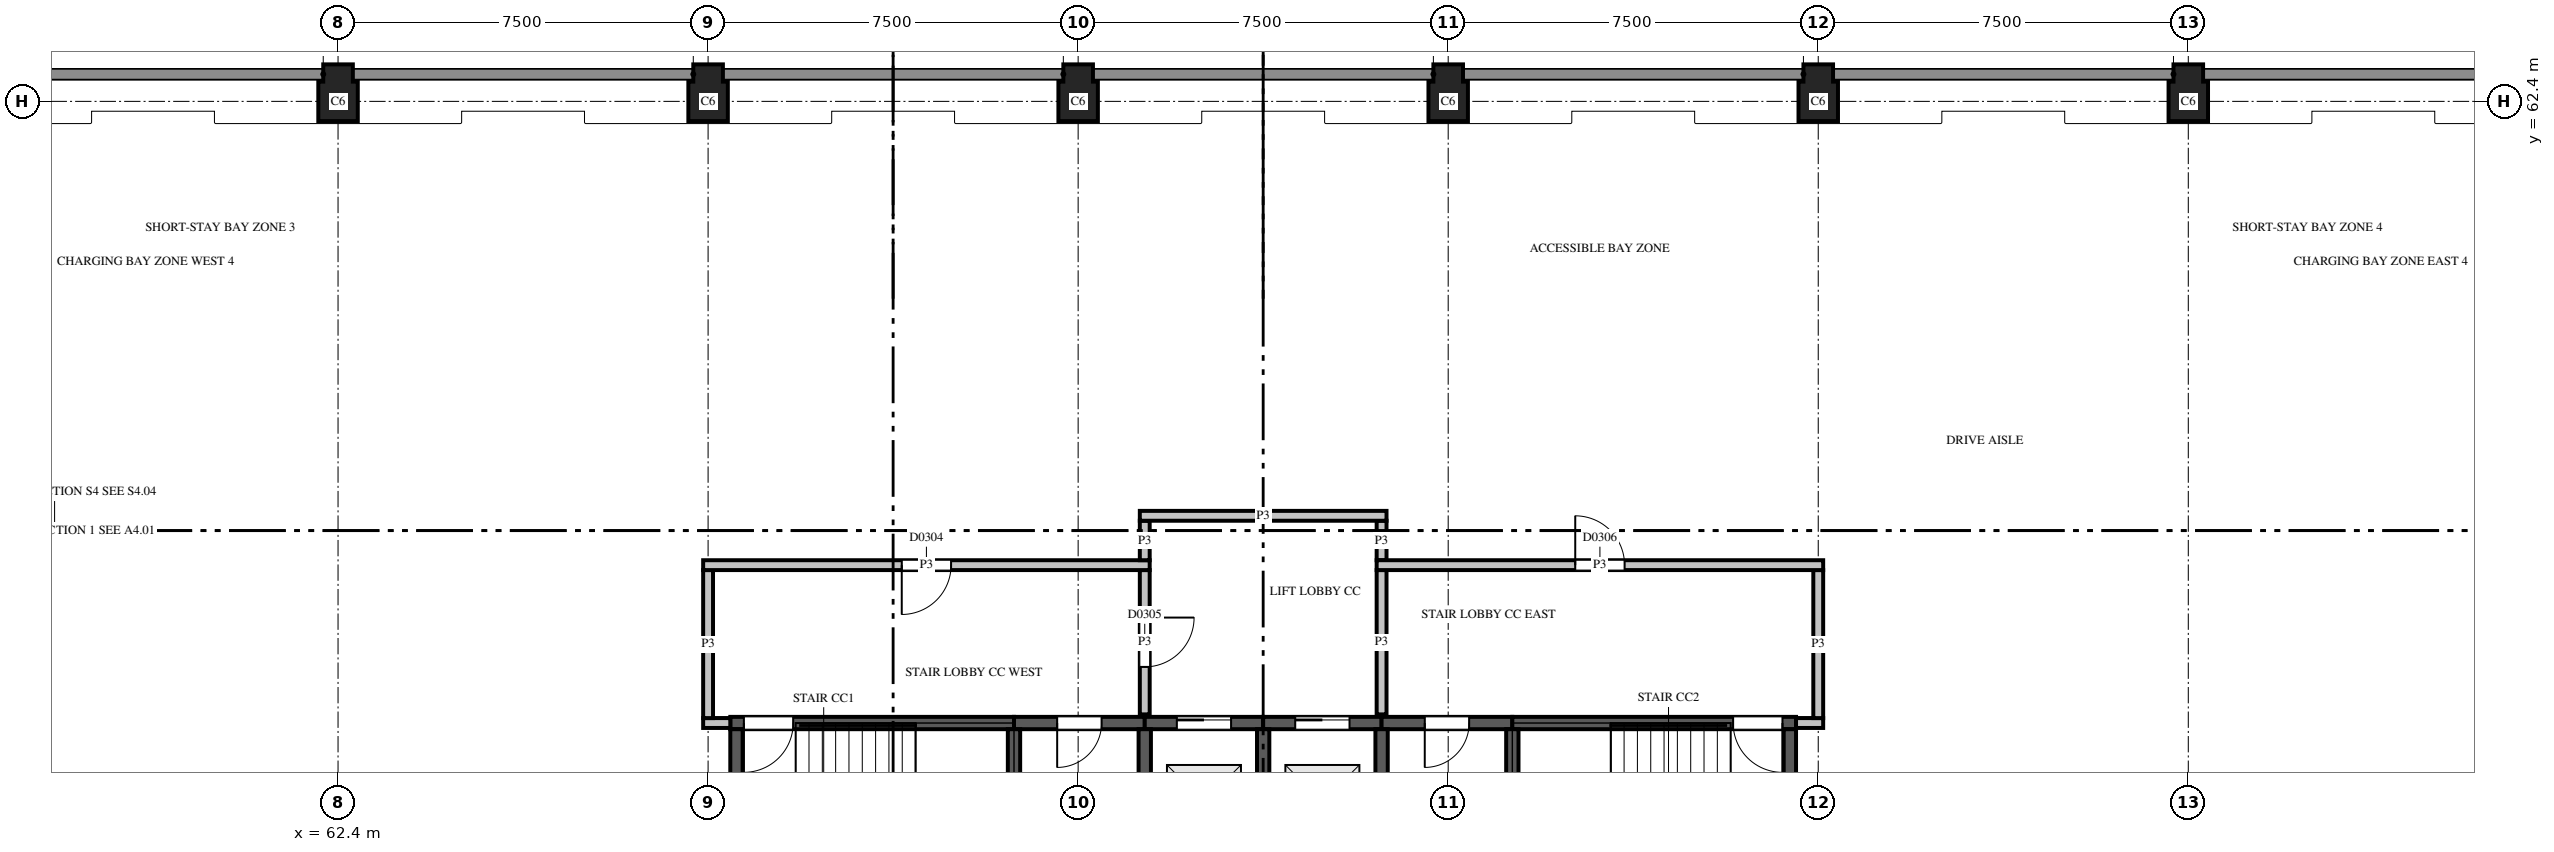
"""IFC4 building model, lengths in metres.
Left out: names, types, materials, properties, quantities, classifications, styles, units other than length and angle.
Written with IfcOpenShell. Run it as: python <this file> out.ifc"""

import sys

from ifc_helpers import new_model, si_unit, direction, frame, frame_2d, origin, place, context, subcontext, project, spatial, polyline, rectangle, outline, extrude, element, fill, save


model = new_model("IFC4")
c1 = context("Model", 3, precision=1e-05, world=origin(), true_north=direction((0.0, 1.0)))
c2 = subcontext(c1, "Body", "Model", "MODEL_VIEW")
j1 = project(units=[si_unit("LENGTHUNIT", "METRE"), si_unit("PLANEANGLEUNIT", "RADIAN")], contexts=[c1])
p1 = place(None, origin())
s1 = spatial("IfcSite", under=j1, at=p1, CompositionType="ELEMENT")
p2 = place(p1, origin())
s2 = spatial("IfcBuilding", under=s1, at=p2, CompositionType="ELEMENT")
p3 = place(p2, frame((0.0, 0.0, 11.9)))
s3 = spatial("IfcBuildingStorey", under=s2, at=p3, CompositionType="ELEMENT", Elevation=11.9)
for number, where, z_axis, x_axis in (
    (1, (62.4, 62.4, 0.0), (0.0, 0.0, 1.0), (0.0, 1.0, 0.0)),
    (2, (69.9, 62.4, 0.0), (0.0, 0.0, 1.0), (0.0, 1.0, 0.0)),
    (3, (77.4, 62.4, 0.0), (0.0, 0.0, 1.0), (0.0, 1.0, 0.0)),
    (4, (84.9, 62.4, 0.0), (0.0, 0.0, 1.0), (0.0, 1.0, 0.0)),
    (5, (92.4, 62.4, 0.0), (0.0, 0.0, 1.0), (0.0, 1.0, 0.0)),
    (6, (99.9, 62.4, 0.0), (0.0, 0.0, 1.0), (0.0, 1.0, 0.0)),
):
    element("IfcColumn", number, at=place(p3, frame(where, z_axis=z_axis, x_axis=x_axis)), inside=s3, PredefinedType="COLUMN", context=c2, shape_type="SweptSolid", body=[
        extrude(outline(polyline([(-0.4, -0.4), (0.4, -0.4), (0.4, -0.3), (0.75, -0.3), (0.75, 0.3), (0.4, 0.3), (0.4, 0.4), (-0.4, 0.4), (-0.4, -0.4)])), origin(), (0.0, 0.0, 1.0), 3.7),
    ])
p4 = place(p3, frame((70.35, 49.8, 0.0), z_axis=(0.0, 0.0, 1.0), x_axis=(1.0, 0.0, 0.0)))
e7 = element("IfcWall", 7, at=p4, inside=s3, PredefinedType="SHEAR", context=c2, shape_type="SweptSolid", body=[
    extrude(rectangle(XDim=5.75, YDim=0.25, at=frame_2d((2.875, 0.0))), origin(), (0.0, 0.0, 1.0), 3.7),
])
p5 = place(p4, frame((0.275, 0.0, 0.0)))
e8 = element("IfcOpeningElement", 8, at=p5, cuts=e7, PredefinedType="OPENING", context=c2, shape_type="SweptSolid", body=[
    extrude(rectangle(XDim=1.0, YDim=2.1, at=frame_2d((0.5, 1.05))), frame((0.0, 0.135, 0.0), z_axis=(0.0, -1.0, 0.0), x_axis=(1.0, 0.0, 0.0)), (0.0, 0.0, 1.0), 0.27),
])
p6 = place(p3, frame((76.1, 49.8, 0.0), z_axis=(0.0, 0.0, 1.0), x_axis=(1.0, 0.0, 0.0)))
e9 = element("IfcWall", 9, at=p6, inside=s3, PredefinedType="SHEAR", context=c2, shape_type="SweptSolid", body=[
    extrude(rectangle(XDim=2.65, YDim=0.25, at=frame_2d((1.325, 0.0))), origin(), (0.0, 0.0, 1.0), 3.7),
])
p7 = place(p6, frame((0.875, 0.0, 0.0)))
e10 = element("IfcOpeningElement", 10, at=p7, cuts=e9, PredefinedType="OPENING", context=c2, shape_type="SweptSolid", body=[
    extrude(rectangle(XDim=0.9, YDim=2.1, at=frame_2d((0.45, 1.05))), frame((0.0, 0.135, 0.0), z_axis=(0.0, -1.0, 0.0), x_axis=(1.0, 0.0, 0.0)), (0.0, 0.0, 1.0), 0.27),
])
p8 = place(p3, frame((78.75, 49.8, 0.0), z_axis=(0.0, 0.0, 1.0), x_axis=(1.0, 0.0, 0.0)))
e11 = element("IfcWall", 11, at=p8, inside=s3, PredefinedType="SHEAR", context=c2, shape_type="SweptSolid", body=[
    extrude(rectangle(XDim=2.4, YDim=0.25, at=frame_2d((1.2, 0.0))), origin(), (0.0, 0.0, 1.0), 3.7),
])
p9 = place(p8, frame((0.65, 0.0, 0.0)))
e12 = element("IfcOpeningElement", 12, at=p9, cuts=e11, PredefinedType="OPENING", context=c2, shape_type="SweptSolid", body=[
    extrude(rectangle(XDim=1.1, YDim=2.1, at=frame_2d((0.55, 1.05))), frame((0.0, 0.135, 0.0), z_axis=(0.0, -1.0, 0.0), x_axis=(1.0, 0.0, 0.0)), (0.0, 0.0, 1.0), 0.27),
])
p10 = place(p3, frame((81.15, 49.8, 0.0), z_axis=(0.0, 0.0, 1.0), x_axis=(1.0, 0.0, 0.0)))
e13 = element("IfcWall", 13, at=p10, inside=s3, PredefinedType="SHEAR", context=c2, shape_type="SweptSolid", body=[
    extrude(rectangle(XDim=2.4, YDim=0.25, at=frame_2d((1.2, 0.0))), origin(), (0.0, 0.0, 1.0), 3.7),
])
p11 = place(p10, frame((0.65, 0.0, 0.0)))
e14 = element("IfcOpeningElement", 14, at=p11, cuts=e13, PredefinedType="OPENING", context=c2, shape_type="SweptSolid", body=[
    extrude(rectangle(XDim=1.1, YDim=2.1, at=frame_2d((0.55, 1.05))), frame((0.0, 0.135, 0.0), z_axis=(0.0, -1.0, 0.0), x_axis=(1.0, 0.0, 0.0)), (0.0, 0.0, 1.0), 0.27),
])
p12 = place(p3, frame((83.55, 49.8, 0.0), z_axis=(0.0, 0.0, 1.0), x_axis=(1.0, 0.0, 0.0)))
e15 = element("IfcWall", 15, at=p12, inside=s3, PredefinedType="SHEAR", context=c2, shape_type="SweptSolid", body=[
    extrude(rectangle(XDim=2.65, YDim=0.25, at=frame_2d((1.325, 0.0))), origin(), (0.0, 0.0, 1.0), 3.7),
])
p13 = place(p12, frame((0.875, 0.0, 0.0)))
e16 = element("IfcOpeningElement", 16, at=p13, cuts=e15, PredefinedType="OPENING", context=c2, shape_type="SweptSolid", body=[
    extrude(rectangle(XDim=0.9, YDim=2.1, at=frame_2d((0.45, 1.05))), frame((0.0, 0.135, 0.0), z_axis=(0.0, -1.0, 0.0), x_axis=(1.0, 0.0, 0.0)), (0.0, 0.0, 1.0), 0.27),
])
p14 = place(p3, frame((86.2, 49.8, 0.0), z_axis=(0.0, 0.0, 1.0), x_axis=(1.0, 0.0, 0.0)))
e17 = element("IfcWall", 17, at=p14, inside=s3, PredefinedType="SHEAR", context=c2, shape_type="SweptSolid", body=[
    extrude(rectangle(XDim=5.75, YDim=0.25, at=frame_2d((2.875, 0.0))), origin(), (0.0, 0.0, 1.0), 3.7),
])
p15 = place(p14, frame((4.475, 0.0, 0.0)))
e18 = element("IfcOpeningElement", 18, at=p15, cuts=e17, PredefinedType="OPENING", context=c2, shape_type="SweptSolid", body=[
    extrude(rectangle(XDim=1.0, YDim=2.1, at=frame_2d((0.5, 1.05))), frame((0.0, 0.135, 0.0), z_axis=(0.0, -1.0, 0.0), x_axis=(1.0, 0.0, 0.0)), (0.0, 0.0, 1.0), 0.27),
])
for number, where, z_axis, x_axis in (
    (19, (70.475, 45.7, 0.0), (0.0, 0.0, 1.0), (0.0, 1.0, 0.0)),
    (20, (76.1, 45.7, 0.0), (0.0, 0.0, 1.0), (0.0, 1.0, 0.0)),
):
    element("IfcWall", number, at=place(p3, frame(where, z_axis=z_axis, x_axis=x_axis)), inside=s3, PredefinedType="SHEAR", context=c2, shape_type="SweptSolid", body=[
        extrude(rectangle(XDim=3.975, YDim=0.25, at=frame_2d((1.988, 0.0))), origin(), (0.0, 0.0, 1.0), 3.7),
    ])
p16 = place(p3, frame((78.75, 46.6, 0.0), z_axis=(0.0, 0.0, 1.0), x_axis=(0.0, 1.0, 0.0)))
e21 = element("IfcWall", 21, at=p16, inside=s3, PredefinedType="SHEAR", context=c2, shape_type="SweptSolid", body=[
    extrude(rectangle(XDim=3.075, YDim=0.25, at=frame_2d((1.538, 0.0))), origin(), (0.0, 0.0, 1.0), 3.7),
])
p17 = place(p3, frame((81.15, 46.725, 0.0), z_axis=(0.0, 0.0, 1.0), x_axis=(0.0, 1.0, 0.0)))
e22 = element("IfcWall", 22, at=p17, inside=s3, PredefinedType="SHEAR", context=c2, shape_type="SweptSolid", body=[
    extrude(rectangle(XDim=2.95, YDim=0.25, at=frame_2d((1.475, 0.0))), origin(), (0.0, 0.0, 1.0), 3.7),
])
p18 = place(p3, frame((83.55, 46.6, 0.0), z_axis=(0.0, 0.0, 1.0), x_axis=(0.0, 1.0, 0.0)))
e23 = element("IfcWall", 23, at=p18, inside=s3, PredefinedType="SHEAR", context=c2, shape_type="SweptSolid", body=[
    extrude(rectangle(XDim=3.075, YDim=0.25, at=frame_2d((1.538, 0.0))), origin(), (0.0, 0.0, 1.0), 3.7),
])
for number, where, z_axis, x_axis in (
    (24, (86.2, 45.7, 0.0), (0.0, 0.0, 1.0), (0.0, 1.0, 0.0)),
    (25, (91.825, 45.7, 0.0), (0.0, 0.0, 1.0), (0.0, 1.0, 0.0)),
):
    element("IfcWall", number, at=place(p3, frame(where, z_axis=z_axis, x_axis=x_axis)), inside=s3, PredefinedType="SHEAR", context=c2, shape_type="SweptSolid", body=[
        extrude(rectangle(XDim=3.975, YDim=0.25, at=frame_2d((1.988, 0.0))), origin(), (0.0, 0.0, 1.0), 3.7),
    ])
for number, where, z_axis, x_axis in (
    (26, (69.8, 49.8, 0.0), (0.0, 0.0, 1.0), (1.0, 0.0, 0.0)),
    (27, (91.95, 49.8, 0.0), (0.0, 0.0, 1.0), (1.0, 0.0, 0.0)),
):
    element("IfcWall", number, at=place(p3, frame(where, z_axis=z_axis, x_axis=x_axis)), inside=s3, PredefinedType="PARTITIONING", context=c2, shape_type="SweptSolid", body=[
        extrude(rectangle(XDim=0.55, YDim=0.2, at=frame_2d((0.275, 0.0))), origin(), (0.0, 0.0, 1.0), 2.88),
    ])
p19 = place(p3, frame((92.4, 49.9, 0.0), z_axis=(0.0, 0.0, 1.0), x_axis=(0.0, 1.0, 0.0)))
e28 = element("IfcWall", 28, at=p19, inside=s3, PredefinedType="PARTITIONING", context=c2, shape_type="SweptSolid", body=[
    extrude(rectangle(XDim=3.0, YDim=0.2, at=frame_2d((1.5, 0.0))), origin(), (0.0, 0.0, 1.0), 2.88),
])
p20 = place(p3, frame((78.75, 49.975, 0.0), z_axis=(0.0, 0.0, 1.0), x_axis=(0.0, 1.0, 0.0)))
e29 = element("IfcWall", 29, at=p20, inside=s3, PredefinedType="PARTITIONING", context=c2, shape_type="SweptSolid", body=[
    extrude(rectangle(XDim=2.925, YDim=0.2, at=frame_2d((1.462, 0.0))), origin(), (0.0, 0.0, 1.0), 2.88),
])
p21 = place(p20, frame((0.962, 0.0, 0.0)))
e30 = element("IfcOpeningElement", 30, at=p21, cuts=e29, PredefinedType="OPENING", context=c2, shape_type="SweptSolid", body=[
    extrude(rectangle(XDim=1.0, YDim=2.1, at=frame_2d((0.5, 1.05))), frame((0.0, 0.11, 0.0), z_axis=(0.0, -1.0, 0.0), x_axis=(1.0, 0.0, 0.0)), (0.0, 0.0, 1.0), 0.22),
])
p22 = place(p3, frame((83.55, 49.975, 0.0), z_axis=(0.0, 0.0, 1.0), x_axis=(0.0, 1.0, 0.0)))
e31 = element("IfcWall", 31, at=p22, inside=s3, PredefinedType="PARTITIONING", context=c2, shape_type="SweptSolid", body=[
    extrude(rectangle(XDim=2.925, YDim=0.2, at=frame_2d((1.462, 0.0))), origin(), (0.0, 0.0, 1.0), 2.88),
])
p23 = place(p3, frame((69.9, 52.9, 0.0), z_axis=(0.0, 0.0, 1.0), x_axis=(0.0, -1.0, 0.0)))
e32 = element("IfcWall", 32, at=p23, inside=s3, PredefinedType="PARTITIONING", context=c2, shape_type="SweptSolid", body=[
    extrude(rectangle(XDim=3.0, YDim=0.2, at=frame_2d((1.5, 0.0))), origin(), (0.0, 0.0, 1.0), 2.88),
])
p24 = place(p3, frame((78.85, 53.0, 0.0), z_axis=(0.0, 0.0, 1.0), x_axis=(-1.0, 0.0, 0.0)))
e33 = element("IfcWall", 33, at=p24, inside=s3, PredefinedType="PARTITIONING", context=c2, shape_type="SweptSolid", body=[
    extrude(rectangle(XDim=9.05, YDim=0.2, at=frame_2d((4.525, 0.0))), origin(), (0.0, 0.0, 1.0), 2.88),
])
p25 = place(p24, frame((4.025, 0.0, 0.0)))
e34 = element("IfcOpeningElement", 34, at=p25, cuts=e33, PredefinedType="OPENING", context=c2, shape_type="SweptSolid", body=[
    extrude(rectangle(XDim=1.0, YDim=2.1, at=frame_2d((0.5, 1.05))), frame((0.0, 0.11, 0.0), z_axis=(0.0, -1.0, 0.0), x_axis=(1.0, 0.0, 0.0)), (0.0, 0.0, 1.0), 0.22),
])
p26 = place(p3, frame((83.55, 53.1, 0.0), z_axis=(0.0, 0.0, 1.0), x_axis=(0.0, 1.0, 0.0)))
e35 = element("IfcWall", 35, at=p26, inside=s3, PredefinedType="PARTITIONING", context=c2, shape_type="SweptSolid", body=[
    extrude(rectangle(XDim=0.8, YDim=0.2, at=frame_2d((0.4, 0.0))), origin(), (0.0, 0.0, 1.0), 2.88),
])
p27 = place(p3, frame((92.5, 53.0, 0.0), z_axis=(0.0, 0.0, 1.0), x_axis=(-1.0, 0.0, 0.0)))
e36 = element("IfcWall", 36, at=p27, inside=s3, PredefinedType="PARTITIONING", context=c2, shape_type="SweptSolid", body=[
    extrude(rectangle(XDim=9.05, YDim=0.2, at=frame_2d((4.525, 0.0))), origin(), (0.0, 0.0, 1.0), 2.88),
])
p28 = place(p27, frame((4.025, 0.0, 0.0)))
e37 = element("IfcOpeningElement", 37, at=p28, cuts=e36, PredefinedType="OPENING", context=c2, shape_type="SweptSolid", body=[
    extrude(rectangle(XDim=1.0, YDim=2.1, at=frame_2d((0.5, 1.05))), frame((0.0, 0.11, 0.0), z_axis=(0.0, -1.0, 0.0), x_axis=(1.0, 0.0, 0.0)), (0.0, 0.0, 1.0), 0.22),
])
p29 = place(p3, frame((78.75, 53.9, 0.0), z_axis=(0.0, 0.0, 1.0), x_axis=(0.0, -1.0, 0.0)))
e38 = element("IfcWall", 38, at=p29, inside=s3, PredefinedType="PARTITIONING", context=c2, shape_type="SweptSolid", body=[
    extrude(rectangle(XDim=0.8, YDim=0.2, at=frame_2d((0.4, 0.0))), origin(), (0.0, 0.0, 1.0), 2.88),
])
p30 = place(p3, frame((83.65, 54.0, 0.0), z_axis=(0.0, 0.0, 1.0), x_axis=(-1.0, 0.0, 0.0)))
e39 = element("IfcWall", 39, at=p30, inside=s3, PredefinedType="PARTITIONING", context=c2, shape_type="SweptSolid", body=[
    extrude(rectangle(XDim=5.0, YDim=0.2, at=frame_2d((2.5, 0.0))), origin(), (0.0, 0.0, 1.0), 2.88),
])
p31 = place(p25, origin())
e40 = element("IfcDoor", 40, at=p31, inside=s3, OperationType="SINGLE_SWING_LEFT", PredefinedType="DOOR", context=c2, shape_type="SweptSolid", body=[
    extrude(rectangle(XDim=1.0, YDim=2.1, at=frame_2d((0.5, 1.05))), frame((0.0, 0.025, 0.0), z_axis=(0.0, -1.0, 0.0), x_axis=(1.0, 0.0, 0.0)), (0.0, 0.0, 1.0), 0.05),
])
fill(e34, e40)
p32 = place(p21, origin())
e41 = element("IfcDoor", 41, at=p32, inside=s3, OperationType="SINGLE_SWING_RIGHT", PredefinedType="DOOR", context=c2, shape_type="SweptSolid", body=[
    extrude(rectangle(XDim=1.0, YDim=2.1, at=frame_2d((0.5, 1.05))), frame((0.0, 0.025, 0.0), z_axis=(0.0, -1.0, 0.0), x_axis=(1.0, 0.0, 0.0)), (0.0, 0.0, 1.0), 0.05),
])
fill(e30, e41)
p33 = place(p28, origin())
e42 = element("IfcDoor", 42, at=p33, inside=s3, OperationType="SINGLE_SWING_RIGHT", PredefinedType="DOOR", context=c2, shape_type="SweptSolid", body=[
    extrude(rectangle(XDim=1.0, YDim=2.1, at=frame_2d((0.5, 1.05))), frame((0.0, 0.025, 0.0), z_axis=(0.0, -1.0, 0.0), x_axis=(1.0, 0.0, 0.0)), (0.0, 0.0, 1.0), 0.05),
])
fill(e37, e42)
p34 = place(p9, origin())
e43 = element("IfcDoor", 43, at=p34, inside=s3, OperationType="SLIDING_TO_LEFT", PredefinedType="DOOR", context=c2, shape_type="SweptSolid", body=[
    extrude(rectangle(XDim=1.1, YDim=2.1, at=frame_2d((0.55, 1.05))), frame((0.0, 0.025, 0.0), z_axis=(0.0, -1.0, 0.0), x_axis=(1.0, 0.0, 0.0)), (0.0, 0.0, 1.0), 0.05),
])
fill(e12, e43)
p35 = place(p11, origin())
e44 = element("IfcDoor", 44, at=p35, inside=s3, OperationType="SLIDING_TO_LEFT", PredefinedType="DOOR", context=c2, shape_type="SweptSolid", body=[
    extrude(rectangle(XDim=1.1, YDim=2.1, at=frame_2d((0.55, 1.05))), frame((0.0, 0.025, 0.0), z_axis=(0.0, -1.0, 0.0), x_axis=(1.0, 0.0, 0.0)), (0.0, 0.0, 1.0), 0.05),
])
fill(e14, e44)
p36 = place(p5, origin())
e45 = element("IfcDoor", 45, at=p36, inside=s3, OperationType="SINGLE_SWING_LEFT", PredefinedType="DOOR", context=c2, shape_type="SweptSolid", body=[
    extrude(rectangle(XDim=1.0, YDim=2.1, at=frame_2d((0.5, 1.05))), frame((0.0, 0.025, 0.0), z_axis=(0.0, -1.0, 0.0), x_axis=(1.0, 0.0, 0.0)), (0.0, 0.0, 1.0), 0.05),
])
fill(e8, e45)
p37 = place(p15, origin())
e46 = element("IfcDoor", 46, at=p37, inside=s3, OperationType="SINGLE_SWING_RIGHT", PredefinedType="DOOR", context=c2, shape_type="SweptSolid", body=[
    extrude(rectangle(XDim=1.0, YDim=2.1, at=frame_2d((0.5, 1.05))), frame((0.0, 0.025, 0.0), z_axis=(0.0, -1.0, 0.0), x_axis=(1.0, 0.0, 0.0)), (0.0, 0.0, 1.0), 0.05),
])
fill(e18, e46)
p38 = place(p7, origin())
e47 = element("IfcDoor", 47, at=p38, inside=s3, OperationType="SINGLE_SWING_LEFT", PredefinedType="DOOR", context=c2, shape_type="SweptSolid", body=[
    extrude(rectangle(XDim=0.9, YDim=2.1, at=frame_2d((0.45, 1.05))), frame((0.0, 0.025, 0.0), z_axis=(0.0, -1.0, 0.0), x_axis=(1.0, 0.0, 0.0)), (0.0, 0.0, 1.0), 0.05),
])
fill(e10, e47)
p39 = place(p13, origin())
e48 = element("IfcDoor", 48, at=p39, inside=s3, OperationType="SINGLE_SWING_LEFT", PredefinedType="DOOR", context=c2, shape_type="SweptSolid", body=[
    extrude(rectangle(XDim=0.9, YDim=2.1, at=frame_2d((0.45, 1.05))), frame((0.0, 0.025, 0.0), z_axis=(0.0, -1.0, 0.0), x_axis=(1.0, 0.0, 0.0)), (0.0, 0.0, 1.0), 0.05),
])
fill(e16, e48)
save(model, sys.argv[1])
